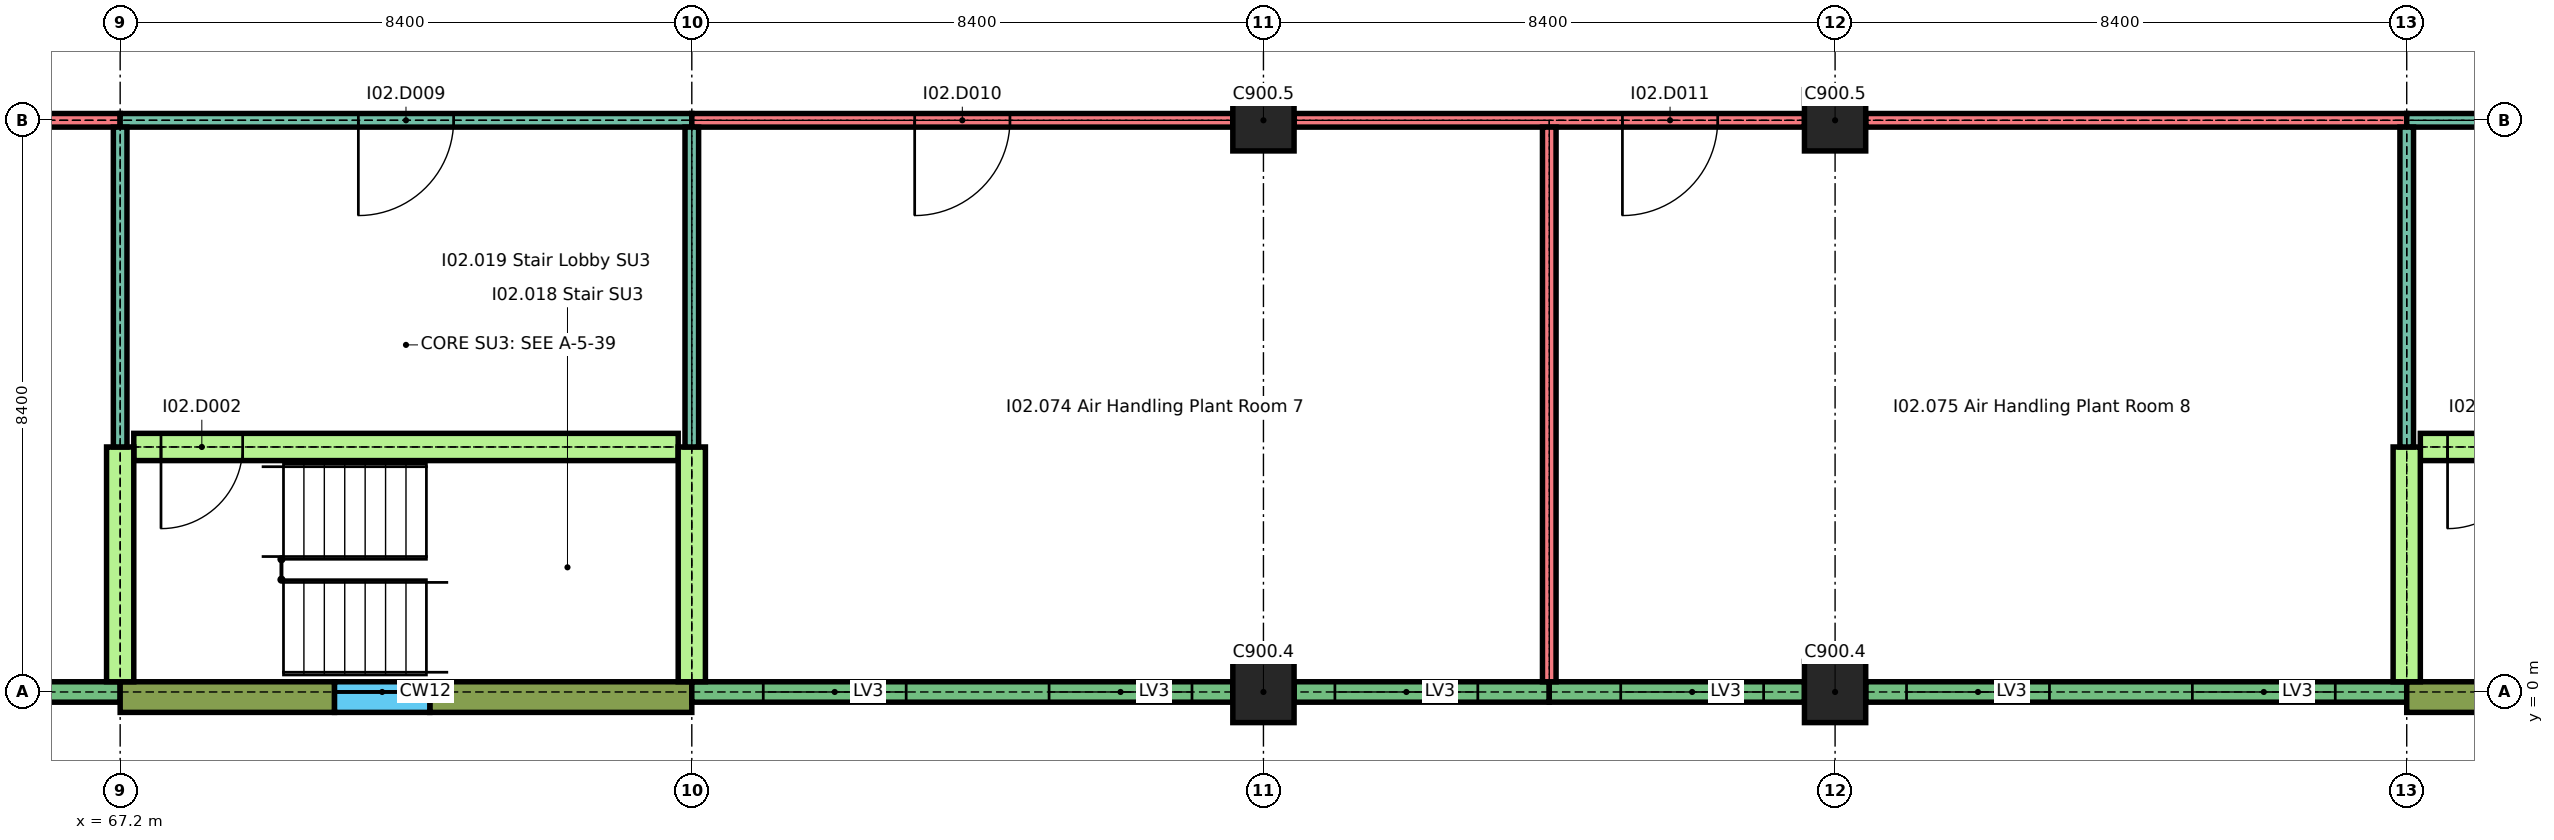
"""IFC4 building model, lengths in metres.
Left out: names, types, materials, properties, quantities, classifications, styles, units other than length and angle.
Written with IfcOpenShell. Run it as: python <this file> out.ifc"""

import sys

from ifc_helpers import new_model, si_unit, direction, frame, frame_2d, origin, origin_2d, place, context, subcontext, project, spatial, rectangle, extrude, element, fill, save


model = new_model("IFC4")
c1 = context("Model", 3, precision=1e-05, world=origin(), true_north=direction((0.0, 1.0)))
c2 = subcontext(c1, "Body", "Model", "MODEL_VIEW")
j1 = project(units=[si_unit("LENGTHUNIT", "METRE"), si_unit("PLANEANGLEUNIT", "RADIAN")], contexts=[c1])
p1 = place(None, origin())
s1 = spatial("IfcSite", under=j1, at=p1, CompositionType="ELEMENT")
p2 = place(p1, origin())
s2 = spatial("IfcBuilding", under=s1, at=p2, CompositionType="ELEMENT")
p3 = place(p2, frame((0.0, 0.0, 12.9)))
s3 = spatial("IfcBuildingStorey", under=s2, at=p3, CompositionType="ELEMENT", Elevation=12.9)
for number, where, z_axis, x_axis in (
    (1, (84.0, 0.0, 0.0), (0.0, 0.0, 1.0), (1.0, 0.0, 0.0)),
    (2, (92.4, 0.0, 0.0), (0.0, 0.0, 1.0), (1.0, 0.0, 0.0)),
    (3, (84.0, 8.4, 0.0), (0.0, 0.0, 1.0), (1.0, 0.0, 0.0)),
    (4, (92.4, 8.4, 0.0), (0.0, 0.0, 1.0), (1.0, 0.0, 0.0)),
):
    element("IfcColumn", number, at=place(p3, frame(where, z_axis=z_axis, x_axis=x_axis)), inside=s3, PredefinedType="COLUMN", context=c2, shape_type="SweptSolid", body=[
        extrude(rectangle(XDim=0.9, YDim=0.9, at=origin_2d()), origin(), (0.0, 0.0, 1.0), 2.04),
    ])
p4 = place(p3, frame((59.25, 0.0, 0.0), z_axis=(0.0, 0.0, 1.0), x_axis=(1.0, 0.0, 0.0)))
e5 = element("IfcWall", 5, at=p4, inside=s3, PredefinedType="SOLIDWALL", context=c2, shape_type="SweptSolid", body=[
    extrude(rectangle(XDim=7.95, YDim=0.3, at=frame_2d((3.975, 0.0))), origin(), (0.0, 0.0, 1.0), 1.74),
])
p5 = place(p4, frame((0.6, 0.0, 0.6)))
e6 = element("IfcOpeningElement", 6, at=p5, cuts=e5, PredefinedType="OPENING", context=c2, shape_type="SweptSolid", body=[
    extrude(rectangle(XDim=2.1, YDim=1.05, at=frame_2d((1.05, 0.525))), frame((0.0, 0.16, 0.0), z_axis=(0.0, -1.0, 0.0), x_axis=(1.0, 0.0, 0.0)), (0.0, 0.0, 1.0), 0.32),
])
p6 = place(p4, frame((4.8, 0.0, 0.6)))
e7 = element("IfcOpeningElement", 7, at=p6, cuts=e5, PredefinedType="OPENING", context=c2, shape_type="SweptSolid", body=[
    extrude(rectangle(XDim=2.1, YDim=1.05, at=frame_2d((1.05, 0.525))), frame((0.0, 0.16, 0.0), z_axis=(0.0, -1.0, 0.0), x_axis=(1.0, 0.0, 0.0)), (0.0, 0.0, 1.0), 0.32),
])
p7 = place(p3, frame((67.2, -0.075, 0.0), z_axis=(0.0, 0.0, 1.0), x_axis=(1.0, 0.0, 0.0)))
e8 = element("IfcWall", 8, at=p7, inside=s3, PredefinedType="SOLIDWALL", context=c2, shape_type="SweptSolid", body=[
    extrude(rectangle(XDim=3.15, YDim=0.45, at=frame_2d((1.575, 0.0))), origin(), (0.0, 0.0, 1.0), 2.04),
])
p8 = place(p3, frame((71.75, -0.075, 0.0), z_axis=(0.0, 0.0, 1.0), x_axis=(1.0, 0.0, 0.0)))
e9 = element("IfcWall", 9, at=p8, inside=s3, PredefinedType="SOLIDWALL", context=c2, shape_type="SweptSolid", body=[
    extrude(rectangle(XDim=3.85, YDim=0.45, at=frame_2d((1.925, 0.0))), origin(), (0.0, 0.0, 1.0), 2.04),
])
p9 = place(p3, frame((70.35, -0.075, 0.0), z_axis=(0.0, 0.0, 1.0), x_axis=(1.0, 0.0, 0.0)))
e10 = element("IfcWall", 10, at=p9, inside=s3, PredefinedType="SOLIDWALL", context=c2, shape_type="SweptSolid", body=[
    extrude(rectangle(XDim=1.4, YDim=0.45, at=frame_2d((0.7, 0.0))), origin(), (0.0, 0.0, 1.0), 0.6),
])
p10 = place(p3, frame((75.6, 0.0, 0.0), z_axis=(0.0, 0.0, 1.0), x_axis=(1.0, 0.0, 0.0)))
e11 = element("IfcWall", 11, at=p10, inside=s3, PredefinedType="SOLIDWALL", context=c2, shape_type="SweptSolid", body=[
    extrude(rectangle(XDim=7.95, YDim=0.3, at=frame_2d((3.975, 0.0))), origin(), (0.0, 0.0, 1.0), 1.74),
])
p11 = place(p10, frame((1.05, 0.0, 0.6)))
e12 = element("IfcOpeningElement", 12, at=p11, cuts=e11, PredefinedType="OPENING", context=c2, shape_type="SweptSolid", body=[
    extrude(rectangle(XDim=2.1, YDim=1.05, at=frame_2d((1.05, 0.525))), frame((0.0, 0.16, 0.0), z_axis=(0.0, -1.0, 0.0), x_axis=(1.0, 0.0, 0.0)), (0.0, 0.0, 1.0), 0.32),
])
p12 = place(p10, frame((5.25, 0.0, 0.6)))
e13 = element("IfcOpeningElement", 13, at=p12, cuts=e11, PredefinedType="OPENING", context=c2, shape_type="SweptSolid", body=[
    extrude(rectangle(XDim=2.1, YDim=1.05, at=frame_2d((1.05, 0.525))), frame((0.0, 0.16, 0.0), z_axis=(0.0, -1.0, 0.0), x_axis=(1.0, 0.0, 0.0)), (0.0, 0.0, 1.0), 0.32),
])
p13 = place(p3, frame((84.45, 0.0, 0.0), z_axis=(0.0, 0.0, 1.0), x_axis=(1.0, 0.0, 0.0)))
e14 = element("IfcWall", 14, at=p13, inside=s3, PredefinedType="SOLIDWALL", context=c2, shape_type="SweptSolid", body=[
    extrude(rectangle(XDim=3.75, YDim=0.3, at=frame_2d((1.875, 0.0))), origin(), (0.0, 0.0, 1.0), 1.74),
])
p14 = place(p13, frame((0.6, 0.0, 0.6)))
e15 = element("IfcOpeningElement", 15, at=p14, cuts=e14, PredefinedType="OPENING", context=c2, shape_type="SweptSolid", body=[
    extrude(rectangle(XDim=2.1, YDim=1.05, at=frame_2d((1.05, 0.525))), frame((0.0, 0.16, 0.0), z_axis=(0.0, -1.0, 0.0), x_axis=(1.0, 0.0, 0.0)), (0.0, 0.0, 1.0), 0.32),
])
p15 = place(p3, frame((88.2, 0.0, 0.0), z_axis=(0.0, 0.0, 1.0), x_axis=(1.0, 0.0, 0.0)))
e16 = element("IfcWall", 16, at=p15, inside=s3, PredefinedType="SOLIDWALL", context=c2, shape_type="SweptSolid", body=[
    extrude(rectangle(XDim=3.75, YDim=0.3, at=frame_2d((1.875, 0.0))), origin(), (0.0, 0.0, 1.0), 1.74),
])
p16 = place(p15, frame((1.05, 0.0, 0.6)))
e17 = element("IfcOpeningElement", 17, at=p16, cuts=e16, PredefinedType="OPENING", context=c2, shape_type="SweptSolid", body=[
    extrude(rectangle(XDim=2.1, YDim=1.05, at=frame_2d((1.05, 0.525))), frame((0.0, 0.16, 0.0), z_axis=(0.0, -1.0, 0.0), x_axis=(1.0, 0.0, 0.0)), (0.0, 0.0, 1.0), 0.32),
])
p17 = place(p3, frame((92.85, 0.0, 0.0), z_axis=(0.0, 0.0, 1.0), x_axis=(1.0, 0.0, 0.0)))
e18 = element("IfcWall", 18, at=p17, inside=s3, PredefinedType="SOLIDWALL", context=c2, shape_type="SweptSolid", body=[
    extrude(rectangle(XDim=7.95, YDim=0.3, at=frame_2d((3.975, 0.0))), origin(), (0.0, 0.0, 1.0), 1.74),
])
p18 = place(p17, frame((0.6, 0.0, 0.6)))
e19 = element("IfcOpeningElement", 19, at=p18, cuts=e18, PredefinedType="OPENING", context=c2, shape_type="SweptSolid", body=[
    extrude(rectangle(XDim=2.1, YDim=1.05, at=frame_2d((1.05, 0.525))), frame((0.0, 0.16, 0.0), z_axis=(0.0, -1.0, 0.0), x_axis=(1.0, 0.0, 0.0)), (0.0, 0.0, 1.0), 0.32),
])
p19 = place(p17, frame((4.8, 0.0, 0.6)))
e20 = element("IfcOpeningElement", 20, at=p19, cuts=e18, PredefinedType="OPENING", context=c2, shape_type="SweptSolid", body=[
    extrude(rectangle(XDim=2.1, YDim=1.05, at=frame_2d((1.05, 0.525))), frame((0.0, 0.16, 0.0), z_axis=(0.0, -1.0, 0.0), x_axis=(1.0, 0.0, 0.0)), (0.0, 0.0, 1.0), 0.32),
])
p20 = place(p3, frame((100.8, -0.075, 0.0), z_axis=(0.0, 0.0, 1.0), x_axis=(1.0, 0.0, 0.0)))
e21 = element("IfcWall", 21, at=p20, inside=s3, PredefinedType="SOLIDWALL", context=c2, shape_type="SweptSolid", body=[
    extrude(rectangle(XDim=3.15, YDim=0.45, at=frame_2d((1.575, 0.0))), origin(), (0.0, 0.0, 1.0), 2.04),
])
p21 = place(p3, frame((67.4, 3.6, 0.0), z_axis=(0.0, 0.0, 1.0), x_axis=(1.0, 0.0, 0.0)))
e22 = element("IfcWall", 22, at=p21, inside=s3, PredefinedType="SHEAR", context=c2, shape_type="SweptSolid", body=[
    extrude(rectangle(XDim=8.0, YDim=0.4, at=frame_2d((4.0, 0.0))), origin(), (0.0, 0.0, 1.0), 2.04),
])
p22 = place(p21, frame((0.4, 0.0, 0.0)))
e23 = element("IfcOpeningElement", 23, at=p22, cuts=e22, PredefinedType="OPENING", context=c2, shape_type="SweptSolid", body=[
    extrude(rectangle(XDim=1.2, YDim=2.0, at=frame_2d((0.6, 1.0))), frame((0.0, 0.21, 0.0), z_axis=(0.0, -1.0, 0.0), x_axis=(1.0, 0.0, 0.0)), (0.0, 0.0, 1.0), 0.42),
])
p23 = place(p3, frame((101.0, 3.6, 0.0), z_axis=(0.0, 0.0, 1.0), x_axis=(1.0, 0.0, 0.0)))
e24 = element("IfcWall", 24, at=p23, inside=s3, PredefinedType="SHEAR", context=c2, shape_type="SweptSolid", body=[
    extrude(rectangle(XDim=8.0, YDim=0.4, at=frame_2d((4.0, 0.0))), origin(), (0.0, 0.0, 1.0), 2.04),
])
p24 = place(p23, frame((0.4, 0.0, 0.0)))
e25 = element("IfcOpeningElement", 25, at=p24, cuts=e24, PredefinedType="OPENING", context=c2, shape_type="SweptSolid", body=[
    extrude(rectangle(XDim=1.2, YDim=2.0, at=frame_2d((0.6, 1.0))), frame((0.0, 0.21, 0.0), z_axis=(0.0, -1.0, 0.0), x_axis=(1.0, 0.0, 0.0)), (0.0, 0.0, 1.0), 0.42),
])
p25 = place(p3, frame((59.25, 8.4, 0.0), z_axis=(0.0, 0.0, 1.0), x_axis=(1.0, 0.0, 0.0)))
e26 = element("IfcWall", 26, at=p25, inside=s3, PredefinedType="SOLIDWALL", context=c2, shape_type="SweptSolid", body=[
    extrude(rectangle(XDim=7.95, YDim=0.2, at=frame_2d((3.975, 0.0))), origin(), (0.0, 0.0, 1.0), 2.04),
])
p26 = place(p3, frame((67.2, 8.4, 0.0), z_axis=(0.0, 0.0, 1.0), x_axis=(1.0, 0.0, 0.0)))
e27 = element("IfcWall", 27, at=p26, inside=s3, PredefinedType="PARTITIONING", context=c2, shape_type="SweptSolid", body=[
    extrude(rectangle(XDim=8.4, YDim=0.2, at=frame_2d((4.2, 0.0))), origin(), (0.0, 0.0, 1.0), 2.04),
])
p27 = place(p26, frame((3.5, 0.0, 0.0)))
e28 = element("IfcOpeningElement", 28, at=p27, cuts=e27, PredefinedType="OPENING", context=c2, shape_type="SweptSolid", body=[
    extrude(rectangle(XDim=1.4, YDim=2.0, at=frame_2d((0.7, 1.0))), frame((0.0, 0.11, 0.0), z_axis=(0.0, -1.0, 0.0), x_axis=(1.0, 0.0, 0.0)), (0.0, 0.0, 1.0), 0.22),
])
p28 = place(p3, frame((75.6, 8.4, 0.0), z_axis=(0.0, 0.0, 1.0), x_axis=(1.0, 0.0, 0.0)))
e29 = element("IfcWall", 29, at=p28, inside=s3, PredefinedType="SOLIDWALL", context=c2, shape_type="SweptSolid", body=[
    extrude(rectangle(XDim=7.95, YDim=0.2, at=frame_2d((3.975, 0.0))), origin(), (0.0, 0.0, 1.0), 2.04),
])
p29 = place(p28, frame((3.275, 0.0, 0.0)))
e30 = element("IfcOpeningElement", 30, at=p29, cuts=e29, PredefinedType="OPENING", context=c2, shape_type="SweptSolid", body=[
    extrude(rectangle(XDim=1.4, YDim=2.0, at=frame_2d((0.7, 1.0))), frame((0.0, 0.11, 0.0), z_axis=(0.0, -1.0, 0.0), x_axis=(1.0, 0.0, 0.0)), (0.0, 0.0, 1.0), 0.22),
])
p30 = place(p3, frame((84.45, 8.4, 0.0), z_axis=(0.0, 0.0, 1.0), x_axis=(1.0, 0.0, 0.0)))
e31 = element("IfcWall", 31, at=p30, inside=s3, PredefinedType="SOLIDWALL", context=c2, shape_type="SweptSolid", body=[
    extrude(rectangle(XDim=7.5, YDim=0.2, at=frame_2d((3.75, 0.0))), origin(), (0.0, 0.0, 1.0), 2.04),
])
p31 = place(p30, frame((4.825, 0.0, 0.0)))
e32 = element("IfcOpeningElement", 32, at=p31, cuts=e31, PredefinedType="OPENING", context=c2, shape_type="SweptSolid", body=[
    extrude(rectangle(XDim=1.4, YDim=2.0, at=frame_2d((0.7, 1.0))), frame((0.0, 0.11, 0.0), z_axis=(0.0, -1.0, 0.0), x_axis=(1.0, 0.0, 0.0)), (0.0, 0.0, 1.0), 0.22),
])
p32 = place(p3, frame((92.85, 8.4, 0.0), z_axis=(0.0, 0.0, 1.0), x_axis=(1.0, 0.0, 0.0)))
e33 = element("IfcWall", 33, at=p32, inside=s3, PredefinedType="SOLIDWALL", context=c2, shape_type="SweptSolid", body=[
    extrude(rectangle(XDim=7.95, YDim=0.2, at=frame_2d((3.975, 0.0))), origin(), (0.0, 0.0, 1.0), 2.04),
])
p33 = place(p3, frame((100.8, 8.4, 0.0), z_axis=(0.0, 0.0, 1.0), x_axis=(1.0, 0.0, 0.0)))
e34 = element("IfcWall", 34, at=p33, inside=s3, PredefinedType="PARTITIONING", context=c2, shape_type="SweptSolid", body=[
    extrude(rectangle(XDim=8.4, YDim=0.2, at=frame_2d((4.2, 0.0))), origin(), (0.0, 0.0, 1.0), 2.04),
])
p34 = place(p33, frame((3.5, 0.0, 0.0)))
e35 = element("IfcOpeningElement", 35, at=p34, cuts=e34, PredefinedType="OPENING", context=c2, shape_type="SweptSolid", body=[
    extrude(rectangle(XDim=1.4, YDim=2.0, at=frame_2d((0.7, 1.0))), frame((0.0, 0.11, 0.0), z_axis=(0.0, -1.0, 0.0), x_axis=(1.0, 0.0, 0.0)), (0.0, 0.0, 1.0), 0.22),
])
p35 = place(p3, frame((67.2, 0.15, 0.0), z_axis=(0.0, 0.0, 1.0), x_axis=(0.0, 1.0, 0.0)))
e36 = element("IfcWall", 36, at=p35, inside=s3, PredefinedType="SHEAR", context=c2, shape_type="SweptSolid", body=[
    extrude(rectangle(XDim=3.45, YDim=0.4, at=frame_2d((1.725, 0.0))), origin(), (0.0, 0.0, 1.0), 2.04),
])
p36 = place(p3, frame((67.2, 3.6, 0.0), z_axis=(0.0, 0.0, 1.0), x_axis=(0.0, 1.0, 0.0)))
e37 = element("IfcWall", 37, at=p36, inside=s3, PredefinedType="PARTITIONING", context=c2, shape_type="SweptSolid", body=[
    extrude(rectangle(XDim=4.7, YDim=0.2, at=frame_2d((2.35, 0.0))), origin(), (0.0, 0.0, 1.0), 2.04),
])
p37 = place(p3, frame((75.6, 0.15, 0.0), z_axis=(0.0, 0.0, 1.0), x_axis=(0.0, 1.0, 0.0)))
e38 = element("IfcWall", 38, at=p37, inside=s3, PredefinedType="SHEAR", context=c2, shape_type="SweptSolid", body=[
    extrude(rectangle(XDim=3.45, YDim=0.4, at=frame_2d((1.725, 0.0))), origin(), (0.0, 0.0, 1.0), 2.04),
])
p38 = place(p3, frame((75.6, 3.6, 0.0), z_axis=(0.0, 0.0, 1.0), x_axis=(0.0, 1.0, 0.0)))
e39 = element("IfcWall", 39, at=p38, inside=s3, PredefinedType="PARTITIONING", context=c2, shape_type="SweptSolid", body=[
    extrude(rectangle(XDim=4.7, YDim=0.2, at=frame_2d((2.35, 0.0))), origin(), (0.0, 0.0, 1.0), 2.04),
])
p39 = place(p3, frame((88.2, 0.15, 0.0), z_axis=(0.0, 0.0, 1.0), x_axis=(0.0, 1.0, 0.0)))
e40 = element("IfcWall", 40, at=p39, inside=s3, PredefinedType="SOLIDWALL", context=c2, shape_type="SweptSolid", body=[
    extrude(rectangle(XDim=8.15, YDim=0.2, at=frame_2d((4.075, 0.0))), origin(), (0.0, 0.0, 1.0), 2.04),
])
p40 = place(p3, frame((100.8, 0.15, 0.0), z_axis=(0.0, 0.0, 1.0), x_axis=(0.0, 1.0, 0.0)))
e41 = element("IfcWall", 41, at=p40, inside=s3, PredefinedType="SHEAR", context=c2, shape_type="SweptSolid", body=[
    extrude(rectangle(XDim=3.45, YDim=0.4, at=frame_2d((1.725, 0.0))), origin(), (0.0, 0.0, 1.0), 2.04),
])
p41 = place(p3, frame((100.8, 3.6, 0.0), z_axis=(0.0, 0.0, 1.0), x_axis=(0.0, 1.0, 0.0)))
e42 = element("IfcWall", 42, at=p41, inside=s3, PredefinedType="PARTITIONING", context=c2, shape_type="SweptSolid", body=[
    extrude(rectangle(XDim=4.7, YDim=0.2, at=frame_2d((2.35, 0.0))), origin(), (0.0, 0.0, 1.0), 2.04),
])
p42 = place(p11, origin())
e43 = element("IfcWindow", 43, at=p42, inside=s3, PartitioningType="SINGLE_PANEL", PredefinedType="WINDOW", context=c2, shape_type="SweptSolid", body=[
    extrude(rectangle(XDim=2.1, YDim=1.05, at=frame_2d((1.05, 0.525))), frame((0.0, 0.075, 0.0), z_axis=(0.0, -1.0, 0.0), x_axis=(1.0, 0.0, 0.0)), (0.0, 0.0, 1.0), 0.15),
])
fill(e12, e43)
p43 = place(p12, origin())
e44 = element("IfcWindow", 44, at=p43, inside=s3, PartitioningType="SINGLE_PANEL", PredefinedType="WINDOW", context=c2, shape_type="SweptSolid", body=[
    extrude(rectangle(XDim=2.1, YDim=1.05, at=frame_2d((1.05, 0.525))), frame((0.0, 0.075, 0.0), z_axis=(0.0, -1.0, 0.0), x_axis=(1.0, 0.0, 0.0)), (0.0, 0.0, 1.0), 0.15),
])
fill(e13, e44)
p44 = place(p14, origin())
e45 = element("IfcWindow", 45, at=p44, inside=s3, PartitioningType="SINGLE_PANEL", PredefinedType="WINDOW", context=c2, shape_type="SweptSolid", body=[
    extrude(rectangle(XDim=2.1, YDim=1.05, at=frame_2d((1.05, 0.525))), frame((0.0, 0.075, 0.0), z_axis=(0.0, -1.0, 0.0), x_axis=(1.0, 0.0, 0.0)), (0.0, 0.0, 1.0), 0.15),
])
fill(e15, e45)
p45 = place(p16, origin())
e46 = element("IfcWindow", 46, at=p45, inside=s3, PartitioningType="SINGLE_PANEL", PredefinedType="WINDOW", context=c2, shape_type="SweptSolid", body=[
    extrude(rectangle(XDim=2.1, YDim=1.05, at=frame_2d((1.05, 0.525))), frame((0.0, 0.075, 0.0), z_axis=(0.0, -1.0, 0.0), x_axis=(1.0, 0.0, 0.0)), (0.0, 0.0, 1.0), 0.15),
])
fill(e17, e46)
p46 = place(p18, origin())
e47 = element("IfcWindow", 47, at=p46, inside=s3, PartitioningType="SINGLE_PANEL", PredefinedType="WINDOW", context=c2, shape_type="SweptSolid", body=[
    extrude(rectangle(XDim=2.1, YDim=1.05, at=frame_2d((1.05, 0.525))), frame((0.0, 0.075, 0.0), z_axis=(0.0, -1.0, 0.0), x_axis=(1.0, 0.0, 0.0)), (0.0, 0.0, 1.0), 0.15),
])
fill(e19, e47)
p47 = place(p19, origin())
e48 = element("IfcWindow", 48, at=p47, inside=s3, PartitioningType="SINGLE_PANEL", PredefinedType="WINDOW", context=c2, shape_type="SweptSolid", body=[
    extrude(rectangle(XDim=2.1, YDim=1.05, at=frame_2d((1.05, 0.525))), frame((0.0, 0.075, 0.0), z_axis=(0.0, -1.0, 0.0), x_axis=(1.0, 0.0, 0.0)), (0.0, 0.0, 1.0), 0.15),
])
fill(e20, e48)
p48 = place(p22, origin())
e49 = element("IfcDoor", 49, at=p48, inside=s3, OperationType="SINGLE_SWING_LEFT", PredefinedType="DOOR", context=c2, shape_type="SweptSolid", body=[
    extrude(rectangle(XDim=1.2, YDim=2.0, at=frame_2d((0.6, 1.0))), frame((0.0, 0.025, 0.0), z_axis=(0.0, -1.0, 0.0), x_axis=(1.0, 0.0, 0.0)), (0.0, 0.0, 1.0), 0.05),
])
fill(e23, e49)
p49 = place(p24, origin())
e50 = element("IfcDoor", 50, at=p49, inside=s3, OperationType="SINGLE_SWING_LEFT", PredefinedType="DOOR", context=c2, shape_type="SweptSolid", body=[
    extrude(rectangle(XDim=1.2, YDim=2.0, at=frame_2d((0.6, 1.0))), frame((0.0, 0.025, 0.0), z_axis=(0.0, -1.0, 0.0), x_axis=(1.0, 0.0, 0.0)), (0.0, 0.0, 1.0), 0.05),
])
fill(e25, e50)
p50 = place(p27, origin())
e51 = element("IfcDoor", 51, at=p50, inside=s3, OperationType="SINGLE_SWING_LEFT", PredefinedType="DOOR", context=c2, shape_type="SweptSolid", body=[
    extrude(rectangle(XDim=1.4, YDim=2.0, at=frame_2d((0.7, 1.0))), frame((0.0, 0.03, 0.0), z_axis=(0.0, -1.0, 0.0), x_axis=(1.0, 0.0, 0.0)), (0.0, 0.0, 1.0), 0.06),
])
fill(e28, e51)
p51 = place(p29, origin())
e52 = element("IfcDoor", 52, at=p51, inside=s3, OperationType="SINGLE_SWING_LEFT", PredefinedType="DOOR", context=c2, shape_type="SweptSolid", body=[
    extrude(rectangle(XDim=1.4, YDim=2.0, at=frame_2d((0.7, 1.0))), frame((0.0, 0.025, 0.0), z_axis=(0.0, -1.0, 0.0), x_axis=(1.0, 0.0, 0.0)), (0.0, 0.0, 1.0), 0.05),
])
fill(e30, e52)
p52 = place(p31, origin())
e53 = element("IfcDoor", 53, at=p52, inside=s3, OperationType="SINGLE_SWING_LEFT", PredefinedType="DOOR", context=c2, shape_type="SweptSolid", body=[
    extrude(rectangle(XDim=1.4, YDim=2.0, at=frame_2d((0.7, 1.0))), frame((0.0, 0.025, 0.0), z_axis=(0.0, -1.0, 0.0), x_axis=(1.0, 0.0, 0.0)), (0.0, 0.0, 1.0), 0.05),
])
fill(e32, e53)
save(model, sys.argv[1])
